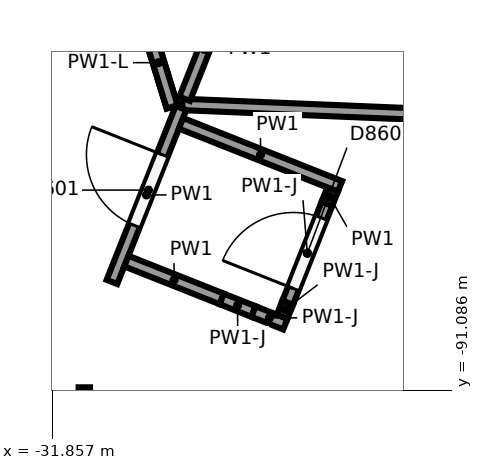
"""IFC4 building model, lengths in metres.
Left out: names, types, materials, properties, quantities, classifications, styles, units other than length and angle.
Written with IfcOpenShell. Run it as: python <this file> out.ifc"""

import sys

from ifc_helpers import new_model, si_unit, direction, frame, frame_2d, origin, place, context, subcontext, project, spatial, rectangle, extrude, element, fill, save


model = new_model("IFC4")
c1 = context("Model", 3, precision=1e-05, world=origin(), true_north=direction((0.0, 1.0)))
c2 = subcontext(c1, "Body", "Model", "MODEL_VIEW")
j1 = project(units=[si_unit("LENGTHUNIT", "METRE"), si_unit("PLANEANGLEUNIT", "RADIAN")], contexts=[c1])
p1 = place(None, origin())
s1 = spatial("IfcSite", under=j1, at=p1, CompositionType="ELEMENT")
p2 = place(p1, origin())
s2 = spatial("IfcBuilding", under=s1, at=p2, CompositionType="ELEMENT")
p3 = place(p2, origin())
s3 = spatial("IfcBuildingStorey", under=s2, at=p3, CompositionType="ELEMENT", Elevation=0.0)
p4 = place(p3, frame((-20.534, -87.721, 0.0), z_axis=(0.0, 0.0, 1.0), x_axis=(-0.999155019023, 0.041100461807, 0.0)))
e1 = element("IfcWall", 1, at=p4, inside=s3, PredefinedType="PARTITIONING", context=c2, shape_type="SweptSolid", body=[
    extrude(rectangle(XDim=9.617, YDim=0.15, at=frame_2d((4.809, 0.0))), origin(), (0.0, 0.0, 1.0), 6.15),
])
p5 = place(p3, frame((-30.114, -87.252, 0.0), z_axis=(0.0, 0.0, 1.0), x_axis=(0.36874266044, 0.929531521989, 0.0)))
e2 = element("IfcWall", 2, at=p5, inside=s3, PredefinedType="PARTITIONING", context=c2, shape_type="SweptSolid", body=[
    extrude(rectangle(XDim=1.4, YDim=0.15, at=frame_2d((0.7, 0.0))), origin(), (0.0, 0.0, 1.0), 6.15),
])
p6 = place(p3, frame((-31.433, -92.46, 0.0), z_axis=(0.0, 0.0, 1.0), x_axis=(0.0, 1.0, 0.0)))
e3 = element("IfcWall", 3, at=p6, inside=s3, PredefinedType="PARTITIONING", context=c2, shape_type="SweptSolid", body=[
    extrude(rectangle(XDim=1.413, YDim=0.15, at=frame_2d((0.706, 0.0))), origin(), (0.0, 0.0, 1.0), 6.15),
])
p7 = place(p3, frame((-31.07, -89.661, 0.0), z_axis=(0.0, 0.0, 1.0), x_axis=(0.368859118019, 0.929485315137, 0.0)))
e4 = element("IfcWall", 4, at=p7, inside=s3, PredefinedType="PARTITIONING", context=c2, shape_type="SweptSolid", body=[
    extrude(rectangle(XDim=2.462, YDim=0.15, at=frame_2d((1.231, 0.0))), origin(), (0.0, 0.0, 1.0), 6.15),
])
p8 = place(p7, frame((0.8, 0.0, 0.0)))
e5 = element("IfcOpeningElement", 5, at=p8, cuts=e4, PredefinedType="OPENING", context=c2, shape_type="SweptSolid", body=[
    extrude(rectangle(XDim=1.0, YDim=2.1, at=frame_2d((0.5, 1.05))), frame((0.0, 0.085, 0.0), z_axis=(0.0, -1.0, 0.0), x_axis=(1.0, 0.0, 0.0)), (0.0, 0.0, 1.0), 0.17),
])
p9 = place(p3, frame((-30.88, -89.387, 0.0), z_axis=(0.0, 0.0, 1.0), x_axis=(0.929533022472, -0.368738877981, 0.0)))
e6 = element("IfcWall", 6, at=p9, inside=s3, PredefinedType="PARTITIONING", context=c2, shape_type="SweptSolid", body=[
    extrude(rectangle(XDim=1.35, YDim=0.15, at=frame_2d((0.675, 0.0))), origin(), (0.0, 0.0, 1.0), 6.15),
])
for number, where, z_axis, x_axis in (
    (7, (-29.625, -89.885, 0.0), (0.0, 0.0, 1.0), (0.929, -0.369, 0.0)),
    (8, (-29.207, -90.051, 0.0), (0.0, 0.0, 1.0), (0.93, -0.368, 0.0)),
):
    element("IfcWall", number, at=place(p3, frame(where, z_axis=z_axis, x_axis=x_axis)), inside=s3, PredefinedType="PARTITIONING", context=c2, shape_type="SweptSolid", body=[
        extrude(rectangle(XDim=0.45, YDim=0.15, at=frame_2d((0.225, 0.0))), origin(), (0.0, 0.0, 1.0), 5.05),
    ])
p10 = place(p3, frame((-30.161, -87.574, 0.0), z_axis=(0.0, 0.0, 1.0), x_axis=(0.929535584053, -0.368732420571, 0.0)))
e9 = element("IfcWall", 9, at=p10, inside=s3, PredefinedType="PARTITIONING", context=c2, shape_type="SweptSolid", body=[
    extrude(rectangle(XDim=2.25, YDim=0.15, at=frame_2d((1.125, 0.0))), origin(), (0.0, 0.0, 1.0), 6.15),
])
p11 = place(p3, frame((-28.831, -90.119, 0.0), z_axis=(0.0, 0.0, 1.0), x_axis=(0.368443949151, 0.929649964414, 0.0)))
e10 = element("IfcWall", 10, at=p11, inside=s3, PredefinedType="PARTITIONING", context=c2, shape_type="SweptSolid", body=[
    extrude(rectangle(XDim=0.2, YDim=0.15, at=frame_2d((0.1, 0.0))), origin(), (0.0, 0.0, 1.0), 5.05),
])
p12 = place(p3, frame((-28.757, -89.933, 0.0), z_axis=(0.0, 0.0, 1.0), x_axis=(0.368833562796, 0.929495456124, 0.0)))
e11 = element("IfcWall", 11, at=p12, inside=s3, PredefinedType="PARTITIONING", context=c2, shape_type="SweptSolid", body=[
    extrude(rectangle(XDim=1.4, YDim=0.15, at=frame_2d((0.7, 0.0))), origin(), (0.0, 0.0, 1.0), 5.05),
])
p13 = place(p12, frame((0.2, 0.0, 0.0)))
e12 = element("IfcOpeningElement", 12, at=p13, cuts=e11, PredefinedType="OPENING", context=c2, shape_type="SweptSolid", body=[
    extrude(rectangle(XDim=1.0, YDim=2.1, at=frame_2d((0.5, 1.05))), frame((0.0, 0.085, 0.0), z_axis=(0.0, -1.0, 0.0), x_axis=(1.0, 0.0, 0.0)), (0.0, 0.0, 1.0), 0.17),
])
p14 = place(p3, frame((-28.241, -88.632, 0.0), z_axis=(0.0, 0.0, 1.0), x_axis=(0.368862269938, 0.929484064315, 0.0)))
e13 = element("IfcWall", 13, at=p14, inside=s3, PredefinedType="PARTITIONING", context=c2, shape_type="SweptSolid", body=[
    extrude(rectangle(XDim=0.2, YDim=0.15, at=frame_2d((0.1, 0.0))), origin(), (0.0, 0.0, 1.0), 6.15),
])
p15 = place(p3, frame((-32.074, -81.509, 0.0), z_axis=(0.0, 0.0, 1.0), x_axis=(0.293525002097, -0.955951396852, 0.0)))
e14 = element("IfcWall", 14, at=p15, inside=s3, PredefinedType="PARTITIONING", context=c2, shape_type="SweptSolid", body=[
    extrude(rectangle(XDim=6.118, YDim=0.15, at=frame_2d((3.059, 0.0))), origin(), (0.0, 0.0, 1.0), 4.85),
])
p16 = place(p15, frame((1.25, 0.0, 0.0)))
e15 = element("IfcOpeningElement", 15, at=p16, cuts=e14, PredefinedType="OPENING", context=c2, shape_type="SweptSolid", body=[
    extrude(rectangle(XDim=1.8, YDim=2.1, at=frame_2d((0.9, 1.05))), frame((0.0, 0.085, 0.0), z_axis=(0.0, -1.0, 0.0), x_axis=(1.0, 0.0, 0.0)), (0.0, 0.0, 1.0), 0.17),
])
p17 = place(p3, frame((-30.635, -86.195, 4.85), z_axis=(0.0, 0.0, 1.0), x_axis=(0.293507791135, -0.955956681311, 0.0)))
e16 = element("IfcWall", 16, at=p17, inside=s3, PredefinedType="PARTITIONING", context=c2, shape_type="SweptSolid", body=[
    extrude(rectangle(XDim=1.217, YDim=0.15, at=frame_2d((0.608, 0.0))), origin(), (0.0, 0.0, 1.0), 1.3),
])
p18 = place(p8, origin())
e17 = element("IfcDoor", 17, at=p18, inside=s3, OperationType="SINGLE_SWING_RIGHT", PredefinedType="DOOR", context=c2, shape_type="SweptSolid", body=[
    extrude(rectangle(XDim=1.0, YDim=2.1, at=frame_2d((0.5, 1.05))), frame((0.0, 0.025, 0.0), z_axis=(0.0, -1.0, 0.0), x_axis=(1.0, 0.0, 0.0)), (0.0, 0.0, 1.0), 0.05),
])
fill(e5, e17)
p19 = place(p13, origin())
e18 = element("IfcDoor", 18, at=p19, inside=s3, OperationType="SINGLE_SWING_LEFT", PredefinedType="DOOR", context=c2, shape_type="SweptSolid", body=[
    extrude(rectangle(XDim=1.0, YDim=2.1, at=frame_2d((0.5, 1.05))), frame((0.0, 0.025, 0.0), z_axis=(0.0, -1.0, 0.0), x_axis=(1.0, 0.0, 0.0)), (0.0, 0.0, 1.0), 0.05),
])
fill(e12, e18)
save(model, sys.argv[1])
